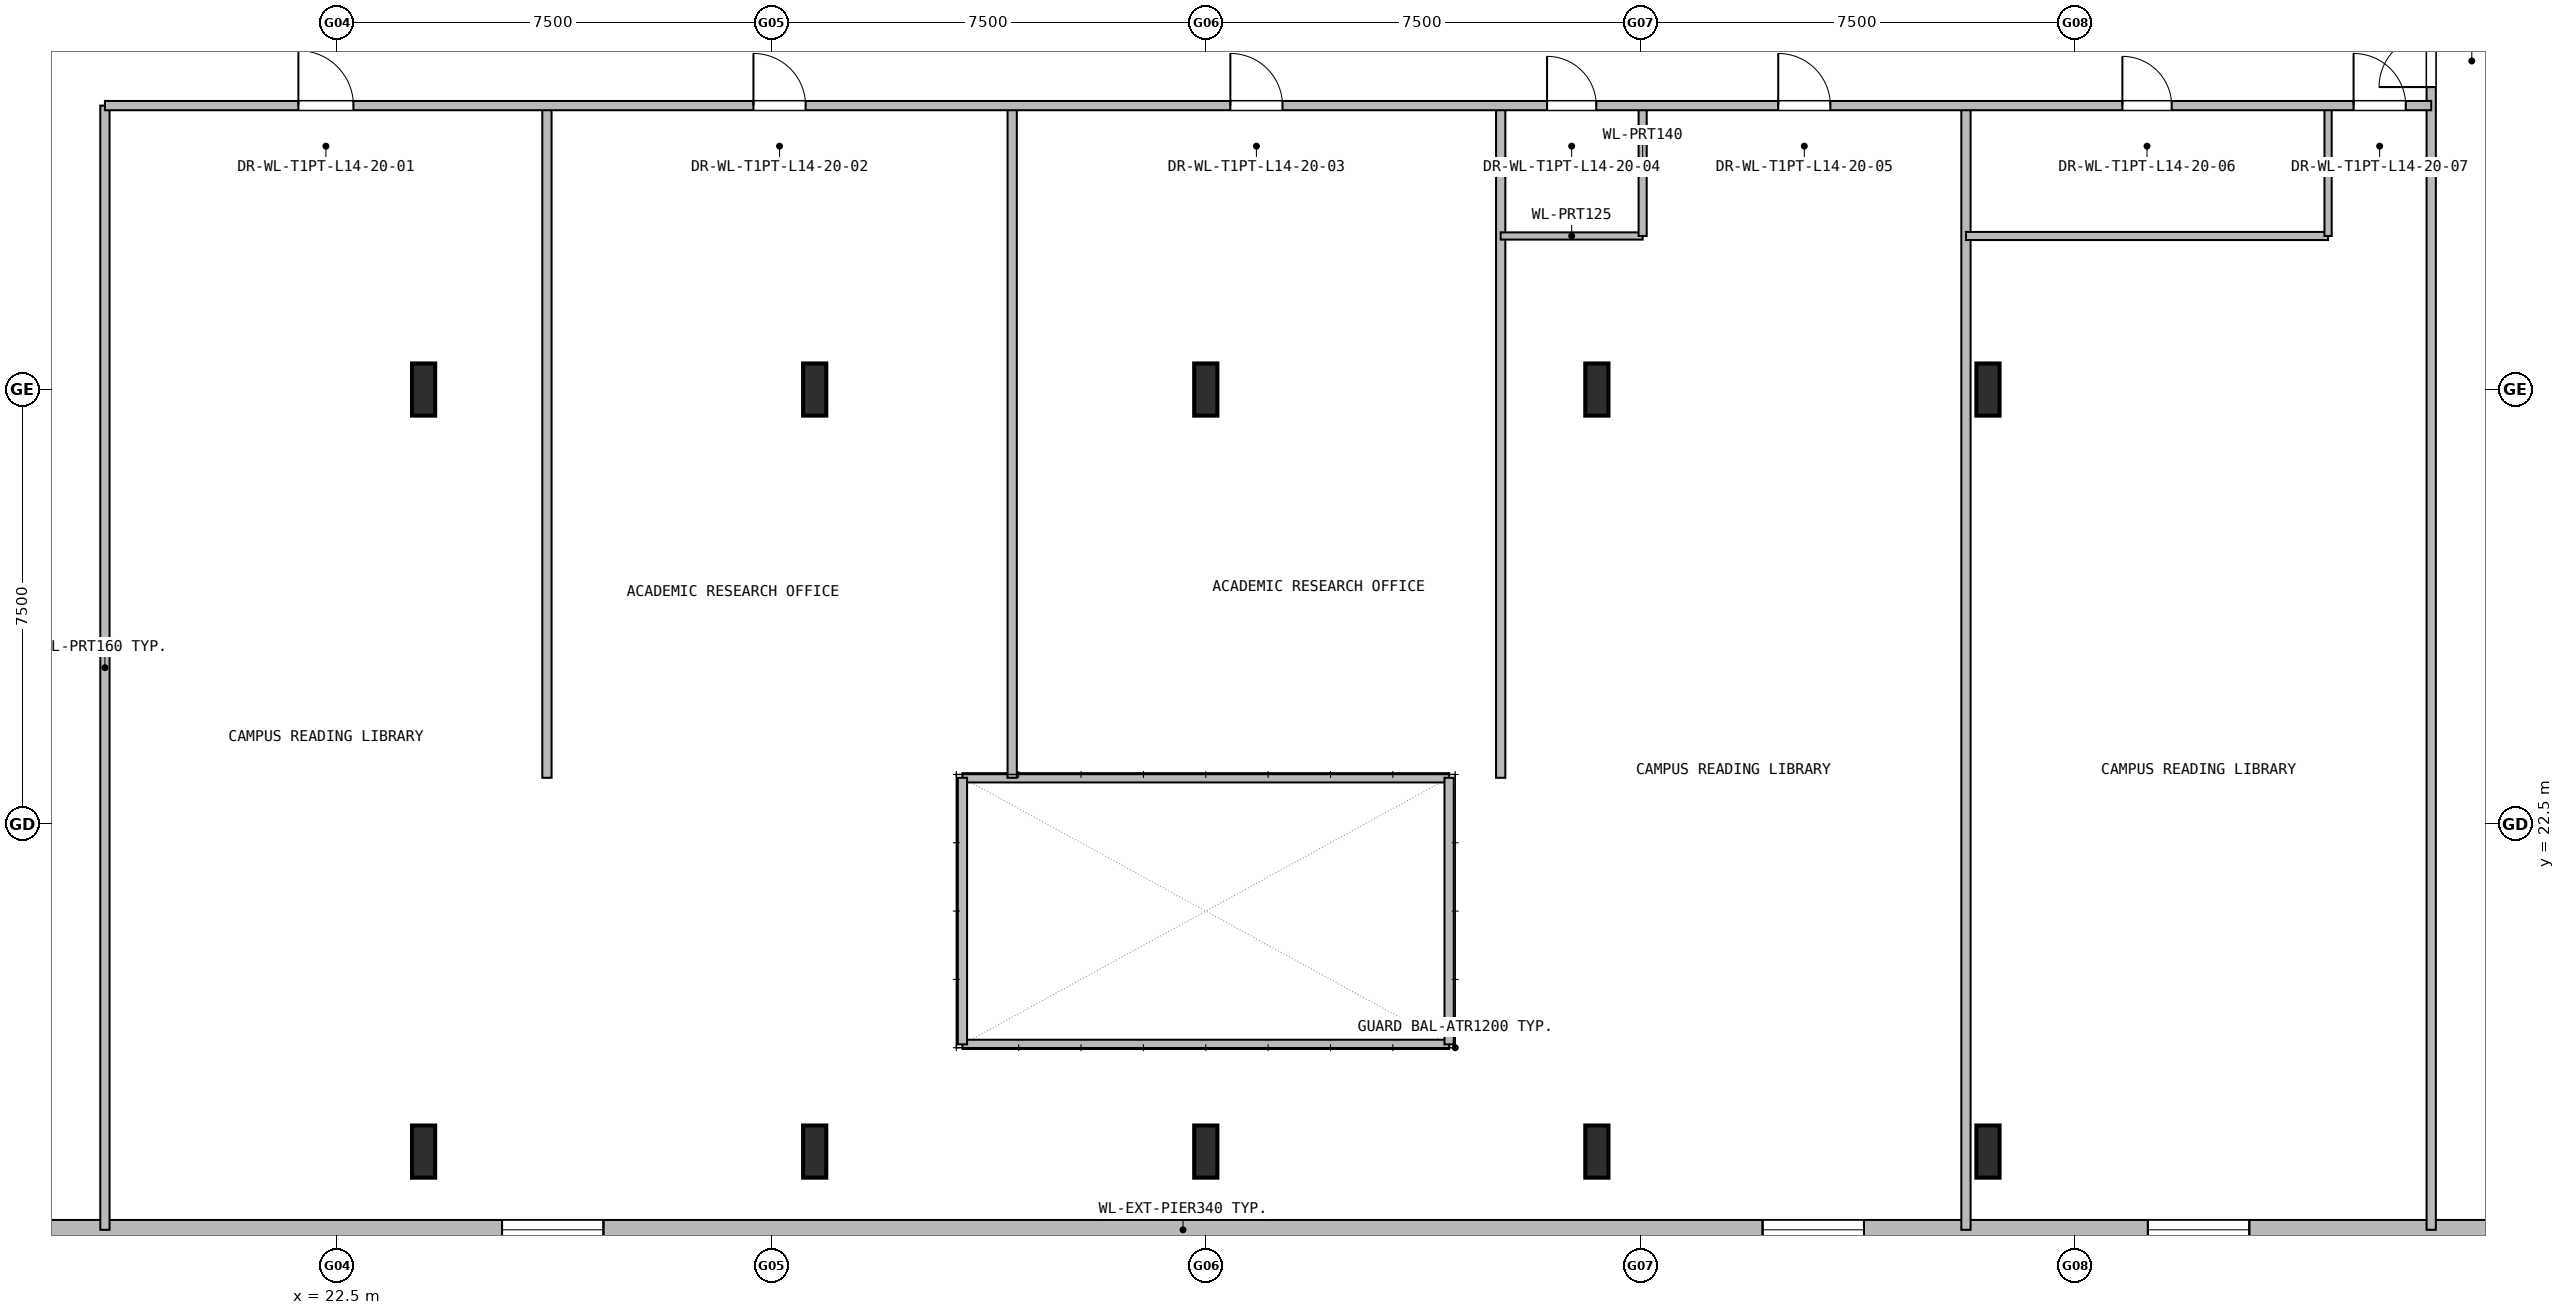
"""IFC4 building model, lengths in metres.
Left out: names, types, materials, properties, quantities, classifications, styles, units other than length and angle.
Written with IfcOpenShell. Run it as: python <this file> out.ifc"""

import sys

from ifc_helpers import new_model, si_unit, direction, frame, frame_2d, origin, origin_2d, place, context, subcontext, project, spatial, rectangle, i_section, extrude, element, fill, save


model = new_model("IFC4")
c1 = context("Model", 3, precision=1e-05, world=origin(), true_north=direction((0.0, 1.0)))
c2 = subcontext(c1, "Body", "Model", "MODEL_VIEW")
j1 = project(units=[si_unit("LENGTHUNIT", "METRE"), si_unit("PLANEANGLEUNIT", "RADIAN")], contexts=[c1])
p1 = place(None, origin())
s1 = spatial("IfcSite", under=j1, at=p1, CompositionType="ELEMENT")
p2 = place(p1, origin())
s2 = spatial("IfcBuilding", under=s1, at=p2, CompositionType="ELEMENT")
p3 = place(p2, frame((0.0, 0.0, 57.0)))
s3 = spatial("IfcBuildingStorey", under=s2, at=p3, CompositionType="ELEMENT", Elevation=57.0)
for number, where, z_axis, x_axis in (
    (1, (24.0, 16.85, 0.0), (0.0, 0.0, 1.0), (1.0, 0.0, 0.0)),
    (2, (24.0, 30.0, 0.0), (0.0, 0.0, 1.0), (1.0, 0.0, 0.0)),
    (3, (30.75, 16.85, 0.0), (0.0, 0.0, 1.0), (1.0, 0.0, 0.0)),
    (4, (30.75, 30.0, 0.0), (0.0, 0.0, 1.0), (1.0, 0.0, 0.0)),
    (5, (37.5, 16.85, 0.0), (0.0, 0.0, 1.0), (1.0, 0.0, 0.0)),
    (6, (37.5, 30.0, 0.0), (0.0, 0.0, 1.0), (1.0, 0.0, 0.0)),
    (7, (44.25, 16.85, 0.0), (0.0, 0.0, 1.0), (1.0, 0.0, 0.0)),
    (8, (44.25, 30.0, 0.0), (0.0, 0.0, 1.0), (1.0, 0.0, 0.0)),
    (9, (51.0, 16.85, 0.0), (0.0, 0.0, 1.0), (1.0, 0.0, 0.0)),
    (10, (51.0, 30.0, 0.0), (0.0, 0.0, 1.0), (1.0, 0.0, 0.0)),
):
    element("IfcColumn", number, at=place(p3, frame(where, z_axis=z_axis, x_axis=x_axis)), inside=s3, PredefinedType="COLUMN", context=c2, shape_type="SweptSolid", body=[
        extrude(i_section(OverallWidth=0.4, OverallDepth=0.9, WebThickness=0.02, FlangeThickness=0.036, at=origin_2d()), origin(), (0.0, 0.0, 1.0), 3.3),
    ])
p4 = place(p3, frame((61.0, 15.5, 0.0), z_axis=(0.0, 0.0, 1.0), x_axis=(-1.0, 0.0, 0.0)))
e11 = element("IfcWall", 11, at=p4, inside=s3, PredefinedType="SOLIDWALL", context=c2, shape_type="SweptSolid", body=[
    extrude(rectangle(XDim=47.0, YDim=0.34, at=frame_2d((23.5, 0.0))), origin(), (0.0, 0.0, 1.0), 3.03),
])
p5 = place(p4, frame((45.65, 0.0, 0.8)))
e12 = element("IfcOpeningElement", 12, at=p5, cuts=e11, PredefinedType="OPENING", context=c2, shape_type="SweptSolid", body=[
    extrude(rectangle(XDim=1.1, YDim=1.5, at=frame_2d((0.55, 0.75))), frame((0.0, 0.18, 0.0), z_axis=(0.0, -1.0, 0.0), x_axis=(1.0, 0.0, 0.0)), (0.0, 0.0, 1.0), 0.36),
])
p6 = place(p4, frame((0.25, 0.0, 0.8)))
e13 = element("IfcOpeningElement", 13, at=p6, cuts=e11, PredefinedType="OPENING", context=c2, shape_type="SweptSolid", body=[
    extrude(rectangle(XDim=1.1, YDim=1.5, at=frame_2d((0.55, 0.75))), frame((0.0, 0.18, 0.0), z_axis=(0.0, -1.0, 0.0), x_axis=(1.0, 0.0, 0.0)), (0.0, 0.0, 1.0), 0.36),
])
p7 = place(p4, frame((33.896, 0.0, 0.8)))
e14 = element("IfcOpeningElement", 14, at=p7, cuts=e11, PredefinedType="OPENING", context=c2, shape_type="SweptSolid", body=[
    extrude(rectangle(XDim=1.75, YDim=1.8, at=frame_2d((0.875, 0.9))), frame((0.0, 0.18, 0.0), z_axis=(0.0, -1.0, 0.0), x_axis=(1.0, 0.0, 0.0)), (0.0, 0.0, 1.0), 0.36),
])
p8 = place(p4, frame((12.14, 0.0, 0.8)))
e15 = element("IfcOpeningElement", 15, at=p8, cuts=e11, PredefinedType="OPENING", context=c2, shape_type="SweptSolid", body=[
    extrude(rectangle(XDim=1.75, YDim=1.8, at=frame_2d((0.875, 0.9))), frame((0.0, 0.18, 0.0), z_axis=(0.0, -1.0, 0.0), x_axis=(1.0, 0.0, 0.0)), (0.0, 0.0, 1.0), 0.36),
])
p9 = place(p4, frame((5.49, 0.0, 0.8)))
e16 = element("IfcOpeningElement", 16, at=p9, cuts=e11, PredefinedType="OPENING", context=c2, shape_type="SweptSolid", body=[
    extrude(rectangle(XDim=1.75, YDim=1.8, at=frame_2d((0.875, 0.9))), frame((0.0, 0.18, 0.0), z_axis=(0.0, -1.0, 0.0), x_axis=(1.0, 0.0, 0.0)), (0.0, 0.0, 1.0), 0.36),
])
p10 = place(p3, frame((18.5, 15.5, 0.0), z_axis=(0.0, 0.0, 1.0), x_axis=(0.0, 1.0, 0.0)))
e17 = element("IfcWall", 17, at=p10, inside=s3, PredefinedType="PARTITIONING", context=c2, shape_type="SweptSolid", body=[
    extrude(rectangle(XDim=19.4, YDim=0.16, at=frame_2d((9.7, 0.0))), origin(), (0.0, 0.0, 1.0), 3.03),
])
p11 = place(p3, frame((58.65, 15.5, 0.0), z_axis=(0.0, 0.0, 1.0), x_axis=(0.0, 1.0, 0.0)))
e18 = element("IfcWall", 18, at=p11, inside=s3, PredefinedType="PARTITIONING", context=c2, shape_type="SweptSolid", body=[
    extrude(rectangle(XDim=22.7, YDim=0.16, at=frame_2d((11.35, 0.0))), origin(), (0.0, 0.0, 1.0), 3.03),
])
p12 = place(p11, frame((19.72, 0.0, 0.0)))
e19 = element("IfcOpeningElement", 19, at=p12, cuts=e18, PredefinedType="OPENING", context=c2, shape_type="SweptSolid", body=[
    extrude(rectangle(XDim=0.9, YDim=2.05, at=frame_2d((0.45, 1.025))), frame((0.0, 0.09, 0.0), z_axis=(0.0, -1.0, 0.0), x_axis=(1.0, 0.0, 0.0)), (0.0, 0.0, 1.0), 0.18),
])
for number, where, z_axis, x_axis in (
    (20, (33.3, 18.7, 0.0), (0.0, 0.0, 1.0), (1.0, 0.0, 0.0)),
    (21, (33.3, 23.3, 0.0), (0.0, 0.0, 1.0), (1.0, 0.0, 0.0)),
):
    element("IfcWall", number, at=place(p3, frame(where, z_axis=z_axis, x_axis=x_axis)), inside=s3, PredefinedType="PARTITIONING", context=c2, shape_type="SweptSolid", body=[
        extrude(rectangle(XDim=8.4, YDim=0.16, at=frame_2d((4.2, 0.0))), origin(), (0.0, 0.0, 1.0), 3.03),
    ])
for number, where, z_axis, x_axis in (
    (22, (33.3, 18.7, 0.0), (0.0, 0.0, 1.0), (0.0, 1.0, 0.0)),
    (23, (41.7, 18.7, 0.0), (0.0, 0.0, 1.0), (0.0, 1.0, 0.0)),
):
    element("IfcWall", number, at=place(p3, frame(where, z_axis=z_axis, x_axis=x_axis)), inside=s3, PredefinedType="PARTITIONING", context=c2, shape_type="SweptSolid", body=[
        extrude(rectangle(XDim=4.6, YDim=0.16, at=frame_2d((2.3, 0.0))), origin(), (0.0, 0.0, 1.0), 3.03),
    ])
for number, where, z_axis, x_axis in (
    (24, (26.128, 23.3, 0.0), (0.0, 0.0, 1.0), (0.0, 1.0, 0.0)),
    (25, (34.158, 23.3, 0.0), (0.0, 0.0, 1.0), (0.0, 1.0, 0.0)),
    (26, (42.59, 23.3, 0.0), (0.0, 0.0, 1.0), (0.0, 1.0, 0.0)),
):
    element("IfcWall", number, at=place(p3, frame(where, z_axis=z_axis, x_axis=x_axis)), inside=s3, PredefinedType="PARTITIONING", context=c2, shape_type="SweptSolid", body=[
        extrude(rectangle(XDim=11.6, YDim=0.16, at=frame_2d((5.8, 0.0))), origin(), (0.0, 0.0, 1.0), 3.03),
    ])
p13 = place(p3, frame((42.59, 32.65, 0.0), z_axis=(0.0, 0.0, 1.0), x_axis=(1.0, 0.0, 0.0)))
e27 = element("IfcWall", 27, at=p13, inside=s3, PredefinedType="PARTITIONING", context=c2, shape_type="SweptSolid", body=[
    extrude(rectangle(XDim=2.45, YDim=0.125, at=frame_2d((1.225, 0.0))), origin(), (0.0, 0.0, 1.0), 3.03),
])
p14 = place(p3, frame((45.04, 32.65, 0.0), z_axis=(0.0, 0.0, 1.0), x_axis=(0.0, 1.0, 0.0)))
e28 = element("IfcWall", 28, at=p14, inside=s3, PredefinedType="PARTITIONING", context=c2, shape_type="SweptSolid", body=[
    extrude(rectangle(XDim=2.25, YDim=0.14, at=frame_2d((1.125, 0.0))), origin(), (0.0, 0.0, 1.0), 3.03),
])
p15 = place(p3, frame((50.62, 15.5, 0.0), z_axis=(0.0, 0.0, 1.0), x_axis=(0.0, 1.0, 0.0)))
e29 = element("IfcWall", 29, at=p15, inside=s3, PredefinedType="PARTITIONING", context=c2, shape_type="SweptSolid", body=[
    extrude(rectangle(XDim=19.4, YDim=0.16, at=frame_2d((9.7, 0.0))), origin(), (0.0, 0.0, 1.0), 3.03),
])
p16 = place(p3, frame((50.62, 32.65, 0.0), z_axis=(0.0, 0.0, 1.0), x_axis=(1.0, 0.0, 0.0)))
e30 = element("IfcWall", 30, at=p16, inside=s3, PredefinedType="PARTITIONING", context=c2, shape_type="SweptSolid", body=[
    extrude(rectangle(XDim=6.25, YDim=0.14, at=frame_2d((3.125, 0.0))), origin(), (0.0, 0.0, 1.0), 3.03),
])
p17 = place(p3, frame((56.87, 32.65, 0.0), z_axis=(0.0, 0.0, 1.0), x_axis=(0.0, 1.0, 0.0)))
e31 = element("IfcWall", 31, at=p17, inside=s3, PredefinedType="PARTITIONING", context=c2, shape_type="SweptSolid", body=[
    extrude(rectangle(XDim=2.25, YDim=0.125, at=frame_2d((1.125, 0.0))), origin(), (0.0, 0.0, 1.0), 3.03),
])
p18 = place(p3, frame((18.5, 34.9, 0.0), z_axis=(0.0, 0.0, 1.0), x_axis=(1.0, 0.0, 0.0)))
e32 = element("IfcWall", 32, at=p18, inside=s3, PredefinedType="PARTITIONING", context=c2, shape_type="SweptSolid", body=[
    extrude(rectangle(XDim=40.15, YDim=0.16, at=frame_2d((20.075, 0.0))), origin(), (0.0, 0.0, 1.0), 3.03),
])
p19 = place(p18, frame((3.339, 0.0, 0.0)))
e33 = element("IfcOpeningElement", 33, at=p19, cuts=e32, PredefinedType="OPENING", context=c2, shape_type="SweptSolid", body=[
    extrude(rectangle(XDim=0.95, YDim=2.1, at=frame_2d((0.475, 1.05))), frame((0.0, 0.09, 0.0), z_axis=(0.0, -1.0, 0.0), x_axis=(1.0, 0.0, 0.0)), (0.0, 0.0, 1.0), 0.18),
])
p20 = place(p18, frame((11.193, 0.0, 0.0)))
e34 = element("IfcOpeningElement", 34, at=p20, cuts=e32, PredefinedType="OPENING", context=c2, shape_type="SweptSolid", body=[
    extrude(rectangle(XDim=0.9, YDim=2.05, at=frame_2d((0.45, 1.025))), frame((0.0, 0.09, 0.0), z_axis=(0.0, -1.0, 0.0), x_axis=(1.0, 0.0, 0.0)), (0.0, 0.0, 1.0), 0.18),
])
p21 = place(p18, frame((19.424, 0.0, 0.0)))
e35 = element("IfcOpeningElement", 35, at=p21, cuts=e32, PredefinedType="OPENING", context=c2, shape_type="SweptSolid", body=[
    extrude(rectangle(XDim=0.9, YDim=2.05, at=frame_2d((0.45, 1.025))), frame((0.0, 0.09, 0.0), z_axis=(0.0, -1.0, 0.0), x_axis=(1.0, 0.0, 0.0)), (0.0, 0.0, 1.0), 0.18),
])
p22 = place(p18, frame((24.89, 0.0, 0.0)))
e36 = element("IfcOpeningElement", 36, at=p22, cuts=e32, PredefinedType="OPENING", context=c2, shape_type="SweptSolid", body=[
    extrude(rectangle(XDim=0.85, YDim=2.05, at=frame_2d((0.425, 1.025))), frame((0.0, 0.09, 0.0), z_axis=(0.0, -1.0, 0.0), x_axis=(1.0, 0.0, 0.0)), (0.0, 0.0, 1.0), 0.18),
])
p23 = place(p18, frame((28.88, 0.0, 0.0)))
e37 = element("IfcOpeningElement", 37, at=p23, cuts=e32, PredefinedType="OPENING", context=c2, shape_type="SweptSolid", body=[
    extrude(rectangle(XDim=0.9, YDim=2.05, at=frame_2d((0.45, 1.025))), frame((0.0, 0.09, 0.0), z_axis=(0.0, -1.0, 0.0), x_axis=(1.0, 0.0, 0.0)), (0.0, 0.0, 1.0), 0.18),
])
p24 = place(p18, frame((34.82, 0.0, 0.0)))
e38 = element("IfcOpeningElement", 38, at=p24, cuts=e32, PredefinedType="OPENING", context=c2, shape_type="SweptSolid", body=[
    extrude(rectangle(XDim=0.85, YDim=2.05, at=frame_2d((0.425, 1.025))), frame((0.0, 0.09, 0.0), z_axis=(0.0, -1.0, 0.0), x_axis=(1.0, 0.0, 0.0)), (0.0, 0.0, 1.0), 0.18),
])
p25 = place(p18, frame((38.81, 0.0, 0.0)))
e39 = element("IfcOpeningElement", 39, at=p25, cuts=e32, PredefinedType="OPENING", context=c2, shape_type="SweptSolid", body=[
    extrude(rectangle(XDim=0.9, YDim=2.05, at=frame_2d((0.45, 1.025))), frame((0.0, 0.09, 0.0), z_axis=(0.0, -1.0, 0.0), x_axis=(1.0, 0.0, 0.0)), (0.0, 0.0, 1.0), 0.18),
])
p26 = place(p7, origin())
e40 = element("IfcWindow", 40, at=p26, inside=s3, PartitioningType="SINGLE_PANEL", PredefinedType="WINDOW", context=c2, shape_type="SweptSolid", body=[
    extrude(rectangle(XDim=1.75, YDim=1.8, at=frame_2d((0.875, 0.9))), frame((0.0, 0.03, 0.0), z_axis=(0.0, -1.0, 0.0), x_axis=(1.0, 0.0, 0.0)), (0.0, 0.0, 1.0), 0.06),
])
fill(e14, e40)
p27 = place(p8, origin())
e41 = element("IfcWindow", 41, at=p27, inside=s3, PartitioningType="SINGLE_PANEL", PredefinedType="WINDOW", context=c2, shape_type="SweptSolid", body=[
    extrude(rectangle(XDim=1.75, YDim=1.8, at=frame_2d((0.875, 0.9))), frame((0.0, 0.03, 0.0), z_axis=(0.0, -1.0, 0.0), x_axis=(1.0, 0.0, 0.0)), (0.0, 0.0, 1.0), 0.06),
])
fill(e15, e41)
p28 = place(p9, origin())
e42 = element("IfcWindow", 42, at=p28, inside=s3, PartitioningType="SINGLE_PANEL", PredefinedType="WINDOW", context=c2, shape_type="SweptSolid", body=[
    extrude(rectangle(XDim=1.75, YDim=1.8, at=frame_2d((0.875, 0.9))), frame((0.0, 0.03, 0.0), z_axis=(0.0, -1.0, 0.0), x_axis=(1.0, 0.0, 0.0)), (0.0, 0.0, 1.0), 0.06),
])
fill(e16, e42)
p29 = place(p12, origin())
e43 = element("IfcDoor", 43, at=p29, inside=s3, OperationType="SINGLE_SWING_LEFT", PredefinedType="DOOR", context=c2, shape_type="SweptSolid", body=[
    extrude(rectangle(XDim=0.9, YDim=2.05, at=frame_2d((0.45, 1.025))), frame((0.0, 0.025, 0.0), z_axis=(0.0, -1.0, 0.0), x_axis=(1.0, 0.0, 0.0)), (0.0, 0.0, 1.0), 0.05),
])
fill(e19, e43)
p30 = place(p19, origin())
e44 = element("IfcDoor", 44, at=p30, inside=s3, OperationType="SINGLE_SWING_RIGHT", PredefinedType="DOOR", context=c2, shape_type="SweptSolid", body=[
    extrude(rectangle(XDim=0.95, YDim=2.1, at=frame_2d((0.475, 1.05))), frame((0.0, 0.025, 0.0), z_axis=(0.0, -1.0, 0.0), x_axis=(1.0, 0.0, 0.0)), (0.0, 0.0, 1.0), 0.05),
])
fill(e33, e44)
p31 = place(p20, origin())
e45 = element("IfcDoor", 45, at=p31, inside=s3, OperationType="SINGLE_SWING_LEFT", PredefinedType="DOOR", context=c2, shape_type="SweptSolid", body=[
    extrude(rectangle(XDim=0.9, YDim=2.05, at=frame_2d((0.45, 1.025))), frame((0.0, 0.025, 0.0), z_axis=(0.0, -1.0, 0.0), x_axis=(1.0, 0.0, 0.0)), (0.0, 0.0, 1.0), 0.05),
])
fill(e34, e45)
p32 = place(p21, origin())
e46 = element("IfcDoor", 46, at=p32, inside=s3, OperationType="SINGLE_SWING_RIGHT", PredefinedType="DOOR", context=c2, shape_type="SweptSolid", body=[
    extrude(rectangle(XDim=0.9, YDim=2.05, at=frame_2d((0.45, 1.025))), frame((0.0, 0.025, 0.0), z_axis=(0.0, -1.0, 0.0), x_axis=(1.0, 0.0, 0.0)), (0.0, 0.0, 1.0), 0.05),
])
fill(e35, e46)
p33 = place(p22, origin())
e47 = element("IfcDoor", 47, at=p33, inside=s3, OperationType="SINGLE_SWING_LEFT", PredefinedType="DOOR", context=c2, shape_type="SweptSolid", body=[
    extrude(rectangle(XDim=0.85, YDim=2.05, at=frame_2d((0.425, 1.025))), frame((0.0, 0.025, 0.0), z_axis=(0.0, -1.0, 0.0), x_axis=(1.0, 0.0, 0.0)), (0.0, 0.0, 1.0), 0.05),
])
fill(e36, e47)
p34 = place(p23, origin())
e48 = element("IfcDoor", 48, at=p34, inside=s3, OperationType="SINGLE_SWING_RIGHT", PredefinedType="DOOR", context=c2, shape_type="SweptSolid", body=[
    extrude(rectangle(XDim=0.9, YDim=2.05, at=frame_2d((0.45, 1.025))), frame((0.0, 0.025, 0.0), z_axis=(0.0, -1.0, 0.0), x_axis=(1.0, 0.0, 0.0)), (0.0, 0.0, 1.0), 0.05),
])
fill(e37, e48)
p35 = place(p24, origin())
e49 = element("IfcDoor", 49, at=p35, inside=s3, OperationType="SINGLE_SWING_LEFT", PredefinedType="DOOR", context=c2, shape_type="SweptSolid", body=[
    extrude(rectangle(XDim=0.85, YDim=2.05, at=frame_2d((0.425, 1.025))), frame((0.0, 0.025, 0.0), z_axis=(0.0, -1.0, 0.0), x_axis=(1.0, 0.0, 0.0)), (0.0, 0.0, 1.0), 0.05),
])
fill(e38, e49)
p36 = place(p25, origin())
e50 = element("IfcDoor", 50, at=p36, inside=s3, OperationType="SINGLE_SWING_RIGHT", PredefinedType="DOOR", context=c2, shape_type="SweptSolid", body=[
    extrude(rectangle(XDim=0.9, YDim=2.05, at=frame_2d((0.45, 1.025))), frame((0.0, 0.025, 0.0), z_axis=(0.0, -1.0, 0.0), x_axis=(1.0, 0.0, 0.0)), (0.0, 0.0, 1.0), 0.05),
])
fill(e39, e50)
save(model, sys.argv[1])
